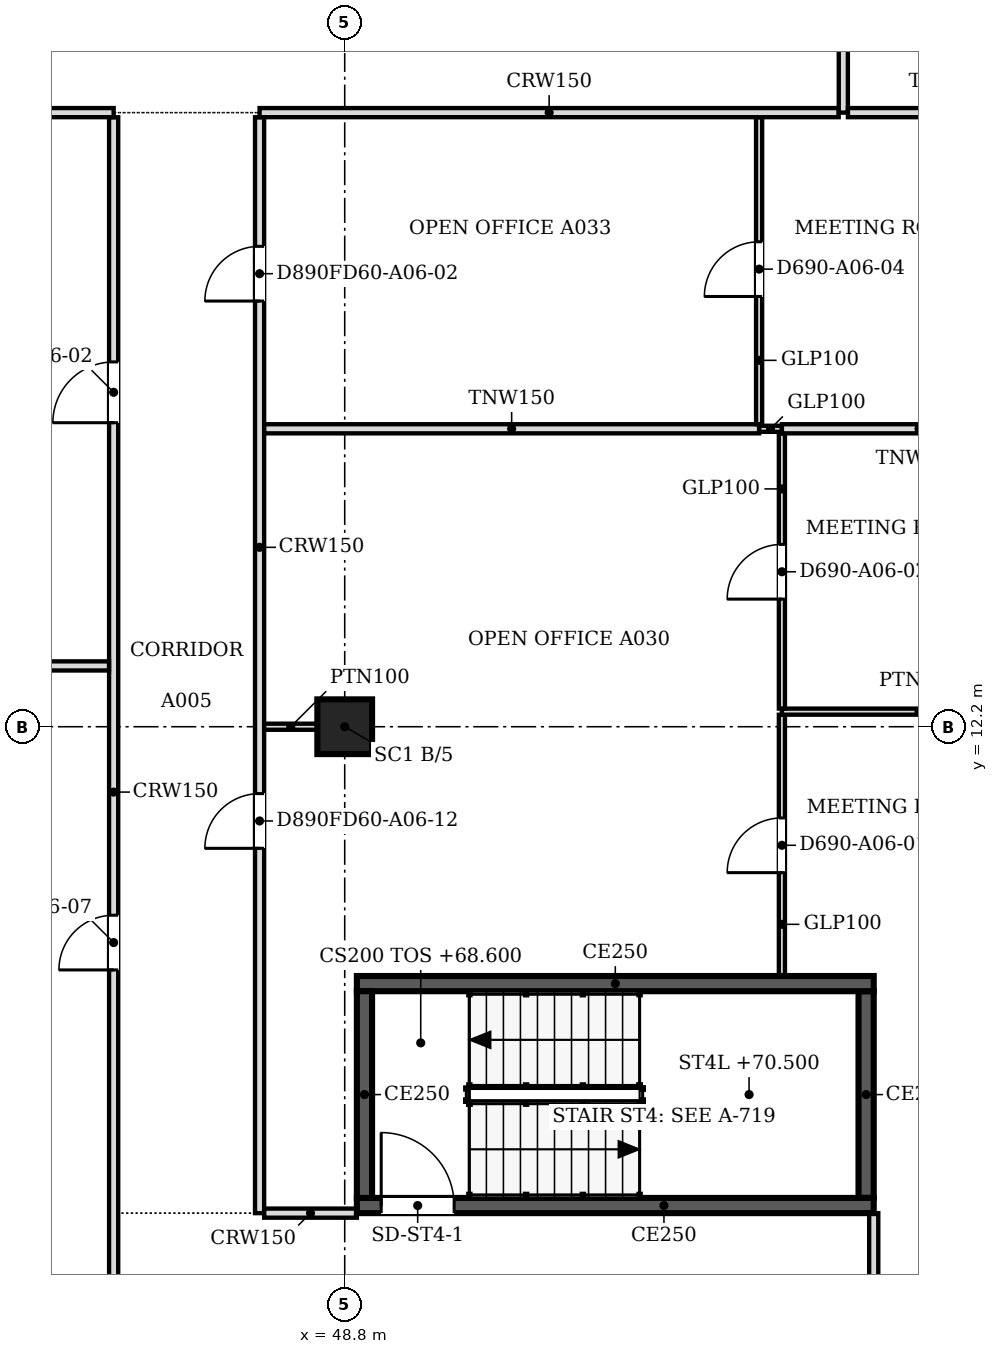
"""IFC4 building model, lengths in metres.
Left out: names, types, materials, properties, quantities, classifications, styles, units other than length and angle.
Written with IfcOpenShell. Run it as: python <this file> out.ifc"""

import sys

from ifc_helpers import new_model, si_unit, direction, frame, frame_2d, origin, origin_2d, place, context, subcontext, project, spatial, polyline, rectangle, outline, extrude, faceted_brep, source, transform, mapped, element, fill, save


model = new_model("IFC4")
c1 = context("Model", 3, precision=1e-05, world=origin(), true_north=direction((0.0, 1.0)))
c2 = subcontext(c1, "Body", "Model", "MODEL_VIEW")
j1 = project(units=[si_unit("LENGTHUNIT", "METRE"), si_unit("PLANEANGLEUNIT", "RADIAN")], contexts=[c1])
p1 = place(None, origin())
s1 = spatial("IfcSite", under=j1, at=p1, CompositionType="ELEMENT")
p2 = place(p1, origin())
s2 = spatial("IfcBuilding", under=s1, at=p2, CompositionType="ELEMENT")
p3 = place(p2, frame((0.0, 0.0, 68.6)))
s3 = spatial("IfcBuildingStorey", under=s2, at=p3, CompositionType="ELEMENT", Elevation=68.6)
p4 = place(p3, frame((48.8, 12.2, 0.0), z_axis=(0.0, 0.0, 1.0), x_axis=(1.0, 0.0, 0.0)))
e1 = element("IfcColumn", 1, at=p4, inside=s3, PredefinedType="COLUMN", context=c2, shape_type="SweptSolid", body=[
    extrude(rectangle(XDim=0.9, YDim=0.9, at=origin_2d()), origin(), (0.0, 0.0, 1.0), 3.6),
])
m1 = source(origin(), c2, "Body", "Brep", [
    faceted_brep([(2.997, -0.25, 3.732), (2.944, -0.25, 3.8), (0.0, -0.25, 0.0), (2.997, -0.25, 0.0), (0.053, 0.25, 0.068), (2.891, 0.25, 3.732), (2.891, 0.25, 0.0), (0.053, 0.25, 0.0), (2.944, 0.0, 3.8), (0.0, 0.0, 0.0)], [[[0, 1, 2, 3]], [[4, 5, 6, 7]], [[8, 1, 0]], [[5, 4, 9, 2, 1, 8]], [[7, 6, 3, 2, 9]], [[7, 9, 4]], [[3, 6, 5, 8, 0]]]),
])
p5 = place(p3, frame((57.606, 1.312, 0.0), z_axis=(0.0, 0.0, 1.0), x_axis=(0.707147509625, 0.707066050402, 0.0)))
e2 = element("IfcWall", 2, at=p5, inside=s3, PredefinedType="SOLIDWALL", context=c2, shape_type="MappedRepresentation", body=[
    mapped(m1, transform((0.0, 0.0, 0.0), scale=1.0)),
])
m2 = source(origin(), c2, "Body", "SweptSolid", [
    extrude(outline(polyline([(2.744, 3.134), (0.51, 0.25), (2.744, 0.25), (2.744, 3.134)])), frame((0.0, 0.26, 0.0), z_axis=(0.0, -1.0, 0.0), x_axis=(1.0, 0.0, 0.0)), (0.0, 0.0, 1.0), 0.52),
])
p6 = place(p5, origin())
e3 = element("IfcOpeningElement", 3, at=p6, cuts=e2, PredefinedType="OPENING", context=c2, shape_type="MappedRepresentation", body=[
    mapped(m2, transform((0.0, 0.0, 0.0), scale=1.0)),
])
p7 = place(p2, frame((0.0, 0.0, 72.4)))
s4 = spatial("IfcBuildingStorey", under=s2, at=p7, CompositionType="ELEMENT", Elevation=72.4)
m3 = source(origin(), c2, "Body", "Brep", [
    faceted_brep([(0.053, -0.25, 0.0), (2.997, -0.25, 3.8), (0.053, -0.25, 7.6), (0.0, -0.25, 7.532), (0.0, -0.25, 0.068), (0.106, 0.25, 7.531), (2.944, 0.25, 3.868), (2.944, 0.25, 3.732), (0.106, 0.25, 0.068), (2.997, 0.0, 3.8), (0.053, 0.0, 0.0), (0.053, 0.0, 7.6)], [[[0, 1, 2, 3, 4]], [[5, 6, 7, 8]], [[8, 7, 9, 1, 0, 10]], [[6, 5, 11, 2, 1, 9]], [[3, 2, 11]], [[10, 0, 4]], [[8, 10, 4, 3, 11, 5]], [[9, 7, 6]]]),
])
p8 = place(p7, frame((57.569, 1.274, -3.8), z_axis=(0.0, 0.0, 1.0), x_axis=(0.707066050402, 0.707147509625, 0.0)))
e4 = element("IfcWall", 4, at=p8, inside=s4, PredefinedType="SOLIDWALL", context=c2, shape_type="MappedRepresentation", body=[
    mapped(m3, transform((0.0, 0.0, 0.0), scale=1.0)),
])
m4 = source(origin(), c2, "Body", "SweptSolid", [
    extrude(outline(polyline([(0.253, 0.666), (2.681, 3.8), (0.253, 6.934), (0.253, 0.666)])), frame((0.0, 0.26, 0.0), z_axis=(0.0, -1.0, 0.0), x_axis=(1.0, 0.0, 0.0)), (0.0, 0.0, 1.0), 0.52),
])
p9 = place(p8, origin())
e5 = element("IfcOpeningElement", 5, at=p9, cuts=e4, PredefinedType="OPENING", context=c2, shape_type="MappedRepresentation", body=[
    mapped(m4, transform((0.0, 0.0, 0.0), scale=1.0)),
])
p10 = place(p3, frame((57.5, 4.325, 0.0), z_axis=(0.0, 0.0, 1.0), x_axis=(-1.0, 0.0, 0.0)))
e6 = element("IfcWall", 6, at=p10, inside=s3, PredefinedType="SOLIDWALL", context=c2, shape_type="SweptSolid", body=[
    extrude(rectangle(XDim=8.5, YDim=0.25, at=frame_2d((4.25, 0.0))), origin(), (0.0, 0.0, 1.0), 3.8),
])
m5 = source(origin(), c2, "Body", "SweptSolid", [
    extrude(rectangle(XDim=1.2, YDim=2.1, at=frame_2d((0.6, 1.05))), frame((0.0, 0.135, 0.0), z_axis=(0.0, -1.0, 0.0), x_axis=(1.0, 0.0, 0.0)), (0.0, 0.0, 1.0), 0.27),
])
p11 = place(p10, frame((6.9, 0.0, 0.0)))
e7 = element("IfcOpeningElement", 7, at=p11, cuts=e6, PredefinedType="OPENING", context=c2, shape_type="MappedRepresentation", body=[
    mapped(m5, transform((0.0, 0.0, 0.0), scale=1.0)),
])
p12 = place(p3, frame((49.125, 4.45, 0.0), z_axis=(0.0, 0.0, 1.0), x_axis=(0.0, 1.0, 0.0)))
e8 = element("IfcWall", 8, at=p12, inside=s3, PredefinedType="SOLIDWALL", context=c2, shape_type="SweptSolid", body=[
    extrude(rectangle(XDim=3.4, YDim=0.25, at=frame_2d((1.7, 0.0))), origin(), (0.0, 0.0, 1.0), 3.8),
])
p13 = place(p3, frame((49.0, 7.975, 0.0), z_axis=(0.0, 0.0, 1.0), x_axis=(1.0, 0.0, 0.0)))
e9 = element("IfcWall", 9, at=p13, inside=s3, PredefinedType="SOLIDWALL", context=c2, shape_type="SweptSolid", body=[
    extrude(rectangle(XDim=8.5, YDim=0.25, at=frame_2d((4.25, 0.0))), origin(), (0.0, 0.0, 1.0), 3.8),
])
p14 = place(p3, frame((57.375, 7.85, 0.0), z_axis=(0.0, 0.0, 1.0), x_axis=(0.0, -1.0, 0.0)))
e10 = element("IfcWall", 10, at=p14, inside=s3, PredefinedType="SOLIDWALL", context=c2, shape_type="SweptSolid", body=[
    extrude(rectangle(XDim=3.4, YDim=0.25, at=frame_2d((1.7, 0.0))), origin(), (0.0, 0.0, 1.0), 3.8),
])
p15 = place(p3, frame((45.0, 0.5, 0.0), z_axis=(0.0, 0.0, 1.0), x_axis=(0.0, 1.0, 0.0)))
e11 = element("IfcWall", 11, at=p15, inside=s3, PredefinedType="PARTITIONING", context=c2, shape_type="SweptSolid", body=[
    extrude(rectangle(XDim=21.724, YDim=0.15, at=frame_2d((10.862, 0.0))), origin(), (0.0, 0.0, 1.0), 3.067),
])
m6 = source(origin(), c2, "Body", "SweptSolid", [
    extrude(rectangle(XDim=0.9, YDim=2.1, at=frame_2d((0.45, 1.05))), frame((0.0, 0.085, 0.0), z_axis=(0.0, -1.0, 0.0), x_axis=(1.0, 0.0, 0.0)), (0.0, 0.0, 1.0), 0.17),
])
p16 = place(p15, frame((7.7, 0.0, 0.0)))
e12 = element("IfcOpeningElement", 12, at=p16, cuts=e11, PredefinedType="OPENING", context=c2, shape_type="MappedRepresentation", body=[
    mapped(m6, transform((0.0, 0.0, 0.0), scale=1.0)),
])
m7 = source(origin(), c2, "Body", "SweptSolid", [
    extrude(rectangle(XDim=1.0, YDim=2.1, at=frame_2d((0.5, 1.05))), frame((0.0, 0.085, 0.0), z_axis=(0.0, -1.0, 0.0), x_axis=(1.0, 0.0, 0.0)), (0.0, 0.0, 1.0), 0.17),
])
p17 = place(p15, frame((16.7, 0.0, 0.0)))
e13 = element("IfcOpeningElement", 13, at=p17, cuts=e11, PredefinedType="OPENING", context=c2, shape_type="MappedRepresentation", body=[
    mapped(m7, transform((0.0, 0.0, 0.0), scale=1.0)),
])
p18 = place(p3, frame((57.5, 1.559, 0.0), z_axis=(0.0, 0.0, 1.0), x_axis=(0.0, 1.0, 0.0)))
e14 = element("IfcWall", 14, at=p18, inside=s3, PredefinedType="PARTITIONING", context=c2, shape_type="SweptSolid", body=[
    extrude(rectangle(XDim=2.641, YDim=0.15, at=frame_2d((1.32, 0.0))), origin(), (0.0, 0.0, 1.0), 3.067),
])
p19 = place(p3, frame((47.4, 22.224, 0.0), z_axis=(0.0, 0.0, 1.0), x_axis=(0.0, -1.0, 0.0)))
e15 = element("IfcWall", 15, at=p19, inside=s3, PredefinedType="PARTITIONING", context=c2, shape_type="SweptSolid", body=[
    extrude(rectangle(XDim=18.024, YDim=0.15, at=frame_2d((9.012, 0.0))), origin(), (0.0, 0.0, 1.0), 3.067),
])
p20 = place(p19, frame((2.123, 0.0, 0.0)))
e16 = element("IfcOpeningElement", 16, at=p20, cuts=e15, PredefinedType="OPENING", context=c2, shape_type="MappedRepresentation", body=[
    mapped(m6, transform((0.0, 0.0, 0.0), scale=1.0)),
])
p21 = place(p19, frame((11.124, 0.0, 0.0)))
e17 = element("IfcOpeningElement", 17, at=p21, cuts=e15, PredefinedType="OPENING", context=c2, shape_type="MappedRepresentation", body=[
    mapped(m6, transform((0.0, 0.0, 0.0), scale=1.0)),
])
p22 = place(p3, frame((47.476, 4.2, 0.0), z_axis=(0.0, 0.0, 1.0), x_axis=(1.0, 0.0, 0.0)))
e18 = element("IfcWall", 18, at=p22, inside=s3, PredefinedType="PARTITIONING", context=c2, shape_type="SweptSolid", body=[
    extrude(rectangle(XDim=1.524, YDim=0.15, at=frame_2d((0.762, 0.0))), origin(), (0.0, 0.0, 1.0), 3.067),
])
p23 = place(p3, frame((55.99, 12.397, 0.0), z_axis=(0.0, 0.0, 1.0), x_axis=(0.0, -1.0, 0.0)))
e19 = element("IfcWall", 19, at=p23, inside=s3, PredefinedType="PARTITIONING", context=c2, shape_type="SweptSolid", body=[
    extrude(rectangle(XDim=4.297, YDim=0.1, at=frame_2d((2.148, 0.0))), origin(), (0.0, 0.0, 1.0), 3.067),
])
m8 = source(origin(), c2, "Body", "SweptSolid", [
    extrude(rectangle(XDim=0.9, YDim=2.1, at=frame_2d((0.45, 1.05))), frame((0.0, 0.06, 0.0), z_axis=(0.0, -1.0, 0.0), x_axis=(1.0, 0.0, 0.0)), (0.0, 0.0, 1.0), 0.12),
])
p24 = place(p23, frame((1.697, 0.0, 0.0)))
e20 = element("IfcOpeningElement", 20, at=p24, cuts=e19, PredefinedType="OPENING", context=c2, shape_type="MappedRepresentation", body=[
    mapped(m8, transform((0.0, 0.0, 0.0), scale=1.0)),
])
p25 = place(p3, frame((48.35, 12.2, 0.0), z_axis=(0.0, 0.0, 1.0), x_axis=(-1.0, 0.0, 0.0)))
e21 = element("IfcWall", 21, at=p25, inside=s3, PredefinedType="PARTITIONING", context=c2, shape_type="SweptSolid", body=[
    extrude(rectangle(XDim=0.875, YDim=0.1, at=frame_2d((0.438, 0.0))), origin(), (0.0, 0.0, 1.0), 3.067),
])
p26 = place(p3, frame((55.99, 12.448, 0.0), z_axis=(0.0, 0.0, 1.0), x_axis=(1.0, 0.0, 0.0)))
e22 = element("IfcWall", 22, at=p26, inside=s3, PredefinedType="PARTITIONING", context=c2, shape_type="SweptSolid", body=[
    extrude(rectangle(XDim=4.51, YDim=0.1, at=frame_2d((2.255, 0.0))), origin(), (0.0, 0.0, 1.0), 3.067),
])
p27 = place(p3, frame((55.99, 17.024, 0.0), z_axis=(0.0, 0.0, 1.0), x_axis=(0.0, -1.0, 0.0)))
e23 = element("IfcWall", 23, at=p27, inside=s3, PredefinedType="PARTITIONING", context=c2, shape_type="SweptSolid", body=[
    extrude(rectangle(XDim=4.525, YDim=0.1, at=frame_2d((2.263, 0.0))), origin(), (0.0, 0.0, 1.0), 3.067),
])
p28 = place(p27, frame((1.825, 0.0, 0.0)))
e24 = element("IfcOpeningElement", 24, at=p28, cuts=e23, PredefinedType="OPENING", context=c2, shape_type="MappedRepresentation", body=[
    mapped(m8, transform((0.0, 0.0, 0.0), scale=1.0)),
])
p29 = place(p3, frame((24.55, 13.2, 0.0), z_axis=(0.0, 0.0, 1.0), x_axis=(1.0, 0.0, 0.0)))
e25 = element("IfcWall", 25, at=p29, inside=s3, PredefinedType="PARTITIONING", context=c2, shape_type="SweptSolid", body=[
    extrude(rectangle(XDim=20.374, YDim=0.15, at=frame_2d((10.187, 0.0))), origin(), (0.0, 0.0, 1.0), 3.067),
])
p30 = place(p3, frame((47.476, 17.1, 0.0), z_axis=(0.0, 0.0, 1.0), x_axis=(1.0, 0.0, 0.0)))
e26 = element("IfcWall", 26, at=p30, inside=s3, PredefinedType="PARTITIONING", context=c2, shape_type="SweptSolid", body=[
    extrude(rectangle(XDim=8.139, YDim=0.15, at=frame_2d((4.069, 0.0))), origin(), (0.0, 0.0, 1.0), 3.067),
])
p31 = place(p3, frame((55.616, 17.1, 0.0), z_axis=(0.0, 0.0, 1.0), x_axis=(1.0, 0.0, 0.0)))
e27 = element("IfcWall", 27, at=p31, inside=s3, PredefinedType="PARTITIONING", context=c2, shape_type="SweptSolid", body=[
    extrude(rectangle(XDim=0.373, YDim=0.1, at=frame_2d((0.187, 0.0))), origin(), (0.0, 0.0, 1.0), 3.067),
])
p32 = place(p3, frame((55.99, 17.1, 0.0), z_axis=(0.0, 0.0, 1.0), x_axis=(1.0, 0.0, 0.0)))
e28 = element("IfcWall", 28, at=p32, inside=s3, PredefinedType="PARTITIONING", context=c2, shape_type="SweptSolid", body=[
    extrude(rectangle(XDim=4.51, YDim=0.15, at=frame_2d((2.255, 0.0))), origin(), (0.0, 0.0, 1.0), 3.067),
])
p33 = place(p3, frame((55.615, 22.224, 0.0), z_axis=(0.0, 0.0, 1.0), x_axis=(0.0, -1.0, 0.0)))
e29 = element("IfcWall", 29, at=p33, inside=s3, PredefinedType="PARTITIONING", context=c2, shape_type="SweptSolid", body=[
    extrude(rectangle(XDim=5.048, YDim=0.1, at=frame_2d((2.524, 0.0))), origin(), (0.0, 0.0, 1.0), 3.067),
])
p34 = place(p33, frame((2.048, 0.0, 0.0)))
e30 = element("IfcOpeningElement", 30, at=p34, cuts=e29, PredefinedType="OPENING", context=c2, shape_type="MappedRepresentation", body=[
    mapped(m8, transform((0.0, 0.0, 0.0), scale=1.0)),
])
p35 = place(p3, frame((30.5, 22.3, 0.0), z_axis=(0.0, 0.0, 1.0), x_axis=(1.0, 0.0, 0.0)))
e31 = element("IfcWall", 31, at=p35, inside=s3, PredefinedType="PARTITIONING", context=c2, shape_type="SweptSolid", body=[
    extrude(rectangle(XDim=14.5, YDim=0.15, at=frame_2d((7.25, 0.0))), origin(), (0.0, 0.0, 1.0), 3.067),
])
p36 = place(p3, frame((47.4, 22.3, 0.0), z_axis=(0.0, 0.0, 1.0), x_axis=(1.0, 0.0, 0.0)))
e32 = element("IfcWall", 32, at=p36, inside=s3, PredefinedType="PARTITIONING", context=c2, shape_type="SweptSolid", body=[
    extrude(rectangle(XDim=9.524, YDim=0.15, at=frame_2d((4.762, 0.0))), origin(), (0.0, 0.0, 1.0), 3.067),
])
p37 = place(p3, frame((57.0, 30.6, 0.0), z_axis=(0.0, 0.0, 1.0), x_axis=(0.0, -1.0, 0.0)))
e33 = element("IfcWall", 33, at=p37, inside=s3, PredefinedType="PARTITIONING", context=c2, shape_type="SweptSolid", body=[
    extrude(rectangle(XDim=8.3, YDim=0.15, at=frame_2d((4.15, 0.0))), origin(), (0.0, 0.0, 1.0), 3.067),
])
p38 = place(p37, frame((3.7, 0.0, 0.0)))
e34 = element("IfcOpeningElement", 34, at=p38, cuts=e33, PredefinedType="OPENING", context=c2, shape_type="MappedRepresentation", body=[
    mapped(m6, transform((0.0, 0.0, 0.0), scale=1.0)),
])
p39 = place(p3, frame((57.076, 22.3, 0.0), z_axis=(0.0, 0.0, 1.0), x_axis=(1.0, 0.0, 0.0)))
e35 = element("IfcWall", 35, at=p39, inside=s3, PredefinedType="PARTITIONING", context=c2, shape_type="SweptSolid", body=[
    extrude(rectangle(XDim=3.424, YDim=0.15, at=frame_2d((1.712, 0.0))), origin(), (0.0, 0.0, 1.0), 3.067),
])
m9 = source(origin(), c2, "Body", "SweptSolid", [
    extrude(rectangle(XDim=1.2, YDim=2.1, at=frame_2d((0.6, 1.05))), frame((0.0, 0.025, 0.0), z_axis=(0.0, -1.0, 0.0), x_axis=(1.0, 0.0, 0.0)), (0.0, 0.0, 1.0), 0.05),
])
p40 = place(p11, origin())
e36 = element("IfcDoor", 36, at=p40, inside=s3, OperationType="SINGLE_SWING_RIGHT", PredefinedType="DOOR", context=c2, shape_type="MappedRepresentation", body=[
    mapped(m9, transform((0.0, 0.0, 0.0), scale=1.0)),
])
fill(e7, e36)
m10 = source(origin(), c2, "Body", "SweptSolid", [
    extrude(rectangle(XDim=0.9, YDim=2.1, at=frame_2d((0.45, 1.05))), frame((0.0, 0.025, 0.0), z_axis=(0.0, -1.0, 0.0), x_axis=(1.0, 0.0, 0.0)), (0.0, 0.0, 1.0), 0.05),
])
p41 = place(p24, origin())
e37 = element("IfcDoor", 37, at=p41, inside=s3, OperationType="SINGLE_SWING_RIGHT", PredefinedType="DOOR", context=c2, shape_type="MappedRepresentation", body=[
    mapped(m10, transform((0.0, 0.0, 0.0), scale=1.0)),
])
fill(e20, e37)
p42 = place(p28, origin())
e38 = element("IfcDoor", 38, at=p42, inside=s3, OperationType="SINGLE_SWING_RIGHT", PredefinedType="DOOR", context=c2, shape_type="MappedRepresentation", body=[
    mapped(m10, transform((0.0, 0.0, 0.0), scale=1.0)),
])
fill(e24, e38)
p43 = place(p34, origin())
e39 = element("IfcDoor", 39, at=p43, inside=s3, OperationType="SINGLE_SWING_RIGHT", PredefinedType="DOOR", context=c2, shape_type="MappedRepresentation", body=[
    mapped(m10, transform((0.0, 0.0, 0.0), scale=1.0)),
])
fill(e30, e39)
p44 = place(p20, origin())
e40 = element("IfcDoor", 40, at=p44, inside=s3, OperationType="SINGLE_SWING_RIGHT", PredefinedType="DOOR", context=c2, shape_type="MappedRepresentation", body=[
    mapped(m10, transform((0.0, 0.0, 0.0), scale=1.0)),
])
fill(e16, e40)
p45 = place(p16, origin())
e41 = element("IfcDoor", 41, at=p45, inside=s3, OperationType="SINGLE_SWING_LEFT", PredefinedType="DOOR", context=c2, shape_type="MappedRepresentation", body=[
    mapped(m10, transform((0.0, 0.0, 0.0), scale=1.0)),
])
fill(e12, e41)
m11 = source(origin(), c2, "Body", "SweptSolid", [
    extrude(rectangle(XDim=1.0, YDim=2.1, at=frame_2d((0.5, 1.05))), frame((0.0, 0.025, 0.0), z_axis=(0.0, -1.0, 0.0), x_axis=(1.0, 0.0, 0.0)), (0.0, 0.0, 1.0), 0.05),
])
p46 = place(p17, origin())
e42 = element("IfcDoor", 42, at=p46, inside=s3, OperationType="SINGLE_SWING_LEFT", PredefinedType="DOOR", context=c2, shape_type="MappedRepresentation", body=[
    mapped(m11, transform((0.0, 0.0, 0.0), scale=1.0)),
])
fill(e13, e42)
p47 = place(p21, origin())
e43 = element("IfcDoor", 43, at=p47, inside=s3, OperationType="SINGLE_SWING_RIGHT", PredefinedType="DOOR", context=c2, shape_type="MappedRepresentation", body=[
    mapped(m10, transform((0.0, 0.0, 0.0), scale=1.0)),
])
fill(e17, e43)
save(model, sys.argv[1])
